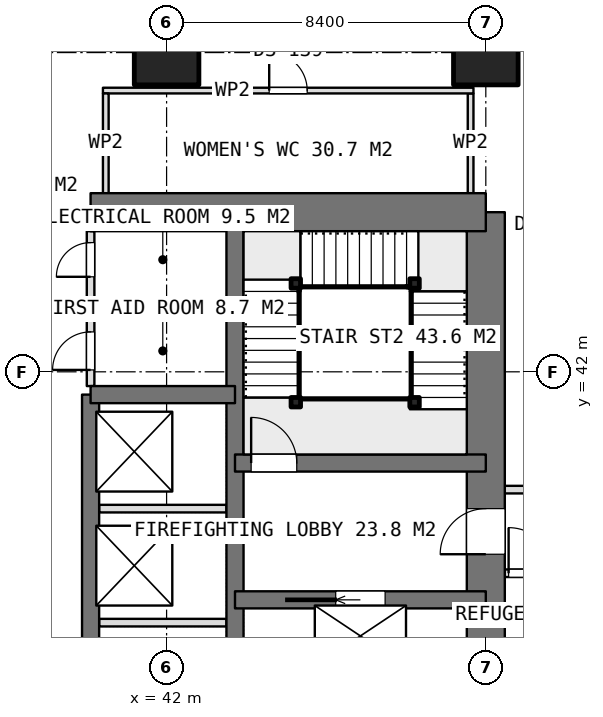
"""IFC4 building model, lengths in metres.
Left out: names, types, materials, properties, quantities, classifications, styles, units other than length and angle.
Written with IfcOpenShell. Run it as: python <this file> out.ifc"""

import sys

from ifc_helpers import new_model, si_unit, direction, frame, frame_2d, origin, origin_2d, place, context, subcontext, project, spatial, rectangle, extrude, element, fill, save


model = new_model("IFC4")
c1 = context("Model", 3, precision=1e-05, world=origin(), true_north=direction((0.0, 1.0)))
c2 = subcontext(c1, "Body", "Model", "MODEL_VIEW")
j1 = project(units=[si_unit("LENGTHUNIT", "METRE"), si_unit("PLANEANGLEUNIT", "RADIAN")], contexts=[c1])
p1 = place(None, origin())
s1 = spatial("IfcSite", under=j1, at=p1, CompositionType="ELEMENT")
p2 = place(p1, origin())
s2 = spatial("IfcBuilding", under=s1, at=p2, CompositionType="ELEMENT")
p3 = place(p2, frame((0.0, 0.0, 129.05)))
s3 = spatial("IfcBuildingStorey", under=s2, at=p3, CompositionType="ELEMENT", Elevation=129.05)
p4 = place(p3, frame((40.0, 46.2, 0.0), z_axis=(0.0, 0.0, 1.0), x_axis=(1.0, 0.0, 0.0)))
e1 = element("IfcWall", 1, at=p4, inside=s3, PredefinedType="SHEAR", context=c2, shape_type="SweptSolid", body=[
    extrude(rectangle(XDim=10.4, YDim=1.0, at=frame_2d((5.2, 0.0))), origin(), (0.0, 0.0, 1.0), 3.75),
])
p5 = place(p3, frame((50.4, 21.0, 0.0), z_axis=(0.0, 0.0, 1.0), x_axis=(0.0, 1.0, 0.0)))
e2 = element("IfcWall", 2, at=p5, inside=s3, PredefinedType="SHEAR", context=c2, shape_type="SweptSolid", body=[
    extrude(rectangle(XDim=25.2, YDim=1.0, at=frame_2d((12.6, 0.0))), origin(), (0.0, 0.0, 1.0), 3.75),
])
p6 = place(p5, frame((16.2, 0.0, 0.0)))
e3 = element("IfcOpeningElement", 3, at=p6, cuts=e2, PredefinedType="OPENING", context=c2, shape_type="SweptSolid", body=[
    extrude(rectangle(XDim=1.2, YDim=2.1, at=frame_2d((0.6, 1.05))), frame((0.0, 0.51, 0.0), z_axis=(0.0, -1.0, 0.0), x_axis=(1.0, 0.0, 0.0)), (0.0, 0.0, 1.0), 1.02),
])
p7 = place(p5, frame((10.05, 0.0, 0.0)))
e4 = element("IfcOpeningElement", 4, at=p7, cuts=e2, PredefinedType="OPENING", context=c2, shape_type="SweptSolid", body=[
    extrude(rectangle(XDim=0.9, YDim=2.1, at=frame_2d((0.45, 1.05))), frame((0.0, 0.51, 0.0), z_axis=(0.0, -1.0, 0.0), x_axis=(1.0, 0.0, 0.0)), (0.0, 0.0, 1.0), 1.02),
])
p8 = place(p5, frame((7.45, 0.0, 0.0)))
e5 = element("IfcOpeningElement", 5, at=p8, cuts=e2, PredefinedType="OPENING", context=c2, shape_type="SweptSolid", body=[
    extrude(rectangle(XDim=0.9, YDim=2.1, at=frame_2d((0.45, 1.05))), frame((0.0, 0.51, 0.0), z_axis=(0.0, -1.0, 0.0), x_axis=(1.0, 0.0, 0.0)), (0.0, 0.0, 1.0), 1.02),
])
p9 = place(p5, frame((0.7, 0.0, 0.0)))
e6 = element("IfcOpeningElement", 6, at=p9, cuts=e2, PredefinedType="OPENING", context=c2, shape_type="SweptSolid", body=[
    extrude(rectangle(XDim=1.2, YDim=2.1, at=frame_2d((0.6, 1.05))), frame((0.0, 0.51, 0.0), z_axis=(0.0, -1.0, 0.0), x_axis=(1.0, 0.0, 0.0)), (0.0, 0.0, 1.0), 1.02),
])
p10 = place(p3, frame((43.8, 21.0, 0.0), z_axis=(0.0, 0.0, 1.0), x_axis=(0.0, 1.0, 0.0)))
e7 = element("IfcWall", 7, at=p10, inside=s3, PredefinedType="SHEAR", context=c2, shape_type="SweptSolid", body=[
    extrude(rectangle(XDim=25.2, YDim=0.45, at=frame_2d((12.6, 0.0))), origin(), (0.0, 0.0, 1.0), 3.75),
])
p11 = place(p3, frame((40.0, 23.4, 0.0), z_axis=(0.0, 0.0, 1.0), x_axis=(0.0, 1.0, 0.0)))
e8 = element("IfcWall", 8, at=p11, inside=s3, PredefinedType="SHEAR", context=c2, shape_type="SweptSolid", body=[
    extrude(rectangle(XDim=18.0, YDim=0.45, at=frame_2d((9.0, 0.0))), origin(), (0.0, 0.0, 1.0), 3.75),
])
p12 = place(p11, frame((0.4, 0.0, 0.0)))
e9 = element("IfcOpeningElement", 9, at=p12, cuts=e8, PredefinedType="OPENING", context=c2, shape_type="SweptSolid", body=[
    extrude(rectangle(XDim=0.9, YDim=2.1, at=frame_2d((0.45, 1.05))), frame((0.0, 0.235, 0.0), z_axis=(0.0, -1.0, 0.0), x_axis=(1.0, 0.0, 0.0)), (0.0, 0.0, 1.0), 0.47),
])
p13 = place(p11, frame((3.35, 0.0, 0.0)))
e10 = element("IfcOpeningElement", 10, at=p13, cuts=e8, PredefinedType="OPENING", context=c2, shape_type="SweptSolid", body=[
    extrude(rectangle(XDim=1.0, YDim=2.1, at=frame_2d((0.5, 1.05))), frame((0.0, 0.235, 0.0), z_axis=(0.0, -1.0, 0.0), x_axis=(1.0, 0.0, 0.0)), (0.0, 0.0, 1.0), 0.47),
])
p14 = place(p3, frame((40.0, 41.4, 0.0), z_axis=(0.0, 0.0, 1.0), x_axis=(1.0, 0.0, 0.0)))
e11 = element("IfcWall", 11, at=p14, inside=s3, PredefinedType="SHEAR", context=c2, shape_type="SweptSolid", body=[
    extrude(rectangle(XDim=3.8, YDim=0.45, at=frame_2d((1.9, 0.0))), origin(), (0.0, 0.0, 1.0), 3.75),
])
p15 = place(p3, frame((43.8, 36.0, 0.0), z_axis=(0.0, 0.0, 1.0), x_axis=(1.0, 0.0, 0.0)))
e12 = element("IfcWall", 12, at=p15, inside=s3, PredefinedType="SHEAR", context=c2, shape_type="SweptSolid", body=[
    extrude(rectangle(XDim=6.6, YDim=0.45, at=frame_2d((3.3, 0.0))), origin(), (0.0, 0.0, 1.0), 3.75),
])
p16 = place(p15, frame((2.65, 0.0, 0.0)))
e13 = element("IfcOpeningElement", 13, at=p16, cuts=e12, PredefinedType="OPENING", context=c2, shape_type="SweptSolid", body=[
    extrude(rectangle(XDim=1.3, YDim=2.1, at=frame_2d((0.65, 1.05))), frame((0.0, 0.235, 0.0), z_axis=(0.0, -1.0, 0.0), x_axis=(1.0, 0.0, 0.0)), (0.0, 0.0, 1.0), 0.47),
])
p17 = place(p3, frame((43.8, 39.6, 0.0), z_axis=(0.0, 0.0, 1.0), x_axis=(1.0, 0.0, 0.0)))
e14 = element("IfcWall", 14, at=p17, inside=s3, PredefinedType="SHEAR", context=c2, shape_type="SweptSolid", body=[
    extrude(rectangle(XDim=6.6, YDim=0.45, at=frame_2d((3.3, 0.0))), origin(), (0.0, 0.0, 1.0), 3.75),
])
p18 = place(p17, frame((0.425, 0.0, 0.0)))
e15 = element("IfcOpeningElement", 15, at=p18, cuts=e14, PredefinedType="OPENING", context=c2, shape_type="SweptSolid", body=[
    extrude(rectangle(XDim=1.2, YDim=2.1, at=frame_2d((0.6, 1.05))), frame((0.0, 0.235, 0.0), z_axis=(0.0, -1.0, 0.0), x_axis=(1.0, 0.0, 0.0)), (0.0, 0.0, 1.0), 0.47),
])
for number, where, z_axis, x_axis in (
    (16, (42.0, 50.4, 0.0), (0.0, 0.0, 1.0), (1.0, 0.0, 0.0)),
    (17, (50.4, 50.4, 0.0), (0.0, 0.0, 1.0), (1.0, 0.0, 0.0)),
):
    element("IfcColumn", number, at=place(p3, frame(where, z_axis=z_axis, x_axis=x_axis)), inside=s3, PredefinedType="COLUMN", context=c2, shape_type="SweptSolid", body=[
        extrude(rectangle(XDim=1.7, YDim=1.7, at=origin_2d()), origin(), (0.0, 0.0, 1.0), 3.75),
    ])
for number, where, z_axis, x_axis in (
    (18, (40.225, 35.4, 0.0), (0.0, 0.0, 1.0), (1.0, 0.0, 0.0)),
    (19, (40.225, 38.4, 0.0), (0.0, 0.0, 1.0), (1.0, 0.0, 0.0)),
):
    element("IfcWall", number, at=place(p3, frame(where, z_axis=z_axis, x_axis=x_axis)), inside=s3, PredefinedType="PARTITIONING", context=c2, shape_type="SweptSolid", body=[
        extrude(rectangle(XDim=3.35, YDim=0.2, at=frame_2d((1.675, 0.0))), origin(), (0.0, 0.0, 1.0), 3.5),
    ])
p19 = place(p3, frame((40.0, 41.625, 0.0), z_axis=(0.0, 0.0, 1.0), x_axis=(0.0, 1.0, 0.0)))
e20 = element("IfcWall", 20, at=p19, inside=s3, PredefinedType="PARTITIONING", context=c2, shape_type="SweptSolid", body=[
    extrude(rectangle(XDim=4.075, YDim=0.2, at=frame_2d((2.038, 0.0))), origin(), (0.0, 0.0, 1.0), 3.5),
])
p20 = place(p19, frame((2.875, 0.0, 0.0)))
e21 = element("IfcOpeningElement", 21, at=p20, cuts=e20, PredefinedType="OPENING", context=c2, shape_type="SweptSolid", body=[
    extrude(rectangle(XDim=0.9, YDim=2.1, at=frame_2d((0.45, 1.05))), frame((0.0, 0.11, 0.0), z_axis=(0.0, -1.0, 0.0), x_axis=(1.0, 0.0, 0.0)), (0.0, 0.0, 1.0), 0.22),
])
p21 = place(p19, frame((0.425, 0.0, 0.0)))
e22 = element("IfcOpeningElement", 22, at=p21, cuts=e20, PredefinedType="OPENING", context=c2, shape_type="SweptSolid", body=[
    extrude(rectangle(XDim=1.0, YDim=2.1, at=frame_2d((0.5, 1.05))), frame((0.0, 0.11, 0.0), z_axis=(0.0, -1.0, 0.0), x_axis=(1.0, 0.0, 0.0)), (0.0, 0.0, 1.0), 0.22),
])
p22 = place(p3, frame((40.0, 43.7, 0.0), z_axis=(0.0, 0.0, 1.0), x_axis=(1.0, 0.0, 0.0)))
e23 = element("IfcWall", 23, at=p22, inside=s3, PredefinedType="PARTITIONING", context=c2, shape_type="SweptSolid", body=[
    extrude(rectangle(XDim=3.575, YDim=0.2, at=frame_2d((1.788, 0.0))), origin(), (0.0, 0.0, 1.0), 3.5),
])
p23 = place(p3, frame((40.325, 49.4, 0.0), z_axis=(0.0, 0.0, 1.0), x_axis=(1.0, 0.0, 0.0)))
e24 = element("IfcWall", 24, at=p23, inside=s3, PredefinedType="PARTITIONING", context=c2, shape_type="SweptSolid", body=[
    extrude(rectangle(XDim=9.75, YDim=0.15, at=frame_2d((4.875, 0.0))), origin(), (0.0, 0.0, 1.0), 3.5),
])
p24 = place(p23, frame((4.375, 0.0, 0.0)))
e25 = element("IfcOpeningElement", 25, at=p24, cuts=e24, PredefinedType="OPENING", context=c2, shape_type="SweptSolid", body=[
    extrude(rectangle(XDim=1.0, YDim=2.1, at=frame_2d((0.5, 1.05))), frame((0.0, 0.085, 0.0), z_axis=(0.0, -1.0, 0.0), x_axis=(1.0, 0.0, 0.0)), (0.0, 0.0, 1.0), 0.17),
])
for number, where, z_axis, x_axis in (
    (26, (40.4, 46.7, 0.0), (0.0, 0.0, 1.0), (0.0, 1.0, 0.0)),
    (27, (50.0, 46.7, 0.0), (0.0, 0.0, 1.0), (0.0, 1.0, 0.0)),
):
    element("IfcWall", number, at=place(p3, frame(where, z_axis=z_axis, x_axis=x_axis)), inside=s3, PredefinedType="PARTITIONING", context=c2, shape_type="SweptSolid", body=[
        extrude(rectangle(XDim=2.625, YDim=0.15, at=frame_2d((1.312, 0.0))), origin(), (0.0, 0.0, 1.0), 3.5),
    ])
for number, where, z_axis, x_axis in (
    (28, (45.4, 41.2, 0.0), (0.0, 0.0, 1.0), (1.0, 0.0, 0.0)),
    (29, (45.4, 44.325, 0.0), (0.0, 0.0, 1.0), (1.0, 0.0, 0.0)),
    (30, (48.525, 44.325, 0.0), (0.0, 0.0, 1.0), (1.0, 0.0, 0.0)),
    (31, (48.525, 41.2, 0.0), (0.0, 0.0, 1.0), (1.0, 0.0, 0.0)),
):
    element("IfcColumn", number, at=place(p3, frame(where, z_axis=z_axis, x_axis=x_axis)), inside=s3, PredefinedType="COLUMN", context=c2, shape_type="SweptSolid", body=[
        extrude(rectangle(XDim=0.25, YDim=0.25, at=origin_2d()), origin(), (0.0, 0.0, 1.0), 3.75),
    ])
p25 = place(p3, frame((50.4, 38.9, 0.0), z_axis=(0.0, 0.0, 1.0), x_axis=(1.0, 0.0, 0.0)))
e32 = element("IfcWall", 32, at=p25, inside=s3, PredefinedType="PARTITIONING", context=c2, shape_type="SweptSolid", body=[
    extrude(rectangle(XDim=6.75, YDim=0.2, at=frame_2d((3.375, 0.0))), origin(), (0.0, 0.0, 1.0), 3.5),
])
p26 = place(p3, frame((50.4, 36.7, 0.0), z_axis=(0.0, 0.0, 1.0), x_axis=(1.0, 0.0, 0.0)))
e33 = element("IfcWall", 33, at=p26, inside=s3, PredefinedType="PARTITIONING", context=c2, shape_type="SweptSolid", body=[
    extrude(rectangle(XDim=6.75, YDim=0.2, at=frame_2d((3.375, 0.0))), origin(), (0.0, 0.0, 1.0), 3.5),
])
p27 = place(p26, frame((0.6, 0.0, 0.0)))
e34 = element("IfcOpeningElement", 34, at=p27, cuts=e33, PredefinedType="OPENING", context=c2, shape_type="SweptSolid", body=[
    extrude(rectangle(XDim=1.2, YDim=2.1, at=frame_2d((0.6, 1.05))), frame((0.0, 0.11, 0.0), z_axis=(0.0, -1.0, 0.0), x_axis=(1.0, 0.0, 0.0)), (0.0, 0.0, 1.0), 0.22),
])
p28 = place(p6, origin())
e35 = element("IfcDoor", 35, at=p28, inside=s3, OperationType="SINGLE_SWING_LEFT", PredefinedType="DOOR", context=c2, shape_type="SweptSolid", body=[
    extrude(rectangle(XDim=1.2, YDim=2.1, at=frame_2d((0.6, 1.05))), frame((0.0, 0.025, 0.0), z_axis=(0.0, -1.0, 0.0), x_axis=(1.0, 0.0, 0.0)), (0.0, 0.0, 1.0), 0.05),
])
fill(e3, e35)
p29 = place(p20, origin())
e36 = element("IfcDoor", 36, at=p29, inside=s3, OperationType="SINGLE_SWING_LEFT", PredefinedType="DOOR", context=c2, shape_type="SweptSolid", body=[
    extrude(rectangle(XDim=0.9, YDim=2.1, at=frame_2d((0.45, 1.05))), frame((0.0, 0.025, 0.0), z_axis=(0.0, -1.0, 0.0), x_axis=(1.0, 0.0, 0.0)), (0.0, 0.0, 1.0), 0.05),
])
fill(e21, e36)
p30 = place(p21, origin())
e37 = element("IfcDoor", 37, at=p30, inside=s3, OperationType="SINGLE_SWING_LEFT", PredefinedType="DOOR", context=c2, shape_type="SweptSolid", body=[
    extrude(rectangle(XDim=1.0, YDim=2.1, at=frame_2d((0.5, 1.05))), frame((0.0, 0.025, 0.0), z_axis=(0.0, -1.0, 0.0), x_axis=(1.0, 0.0, 0.0)), (0.0, 0.0, 1.0), 0.05),
])
fill(e22, e37)
p31 = place(p16, origin())
e38 = element("IfcDoor", 38, at=p31, inside=s3, OperationType="SLIDING_TO_LEFT", PredefinedType="USERDEFINED", context=c2, shape_type="SweptSolid", body=[
    extrude(rectangle(XDim=1.3, YDim=2.1, at=frame_2d((0.65, 1.05))), frame((0.0, 0.025, 0.0), z_axis=(0.0, -1.0, 0.0), x_axis=(1.0, 0.0, 0.0)), (0.0, 0.0, 1.0), 0.05),
])
fill(e13, e38)
p32 = place(p24, origin())
e39 = element("IfcDoor", 39, at=p32, inside=s3, OperationType="SINGLE_SWING_LEFT", PredefinedType="DOOR", context=c2, shape_type="SweptSolid", body=[
    extrude(rectangle(XDim=1.0, YDim=2.1, at=frame_2d((0.5, 1.05))), frame((0.0, 0.025, 0.0), z_axis=(0.0, -1.0, 0.0), x_axis=(1.0, 0.0, 0.0)), (0.0, 0.0, 1.0), 0.05),
])
fill(e25, e39)
p33 = place(p18, origin())
e40 = element("IfcDoor", 40, at=p33, inside=s3, OperationType="SINGLE_SWING_RIGHT", PredefinedType="DOOR", context=c2, shape_type="SweptSolid", body=[
    extrude(rectangle(XDim=1.2, YDim=2.1, at=frame_2d((0.6, 1.05))), frame((0.0, 0.025, 0.0), z_axis=(0.0, -1.0, 0.0), x_axis=(1.0, 0.0, 0.0)), (0.0, 0.0, 1.0), 0.05),
])
fill(e15, e40)
p34 = place(p27, origin())
e41 = element("IfcDoor", 41, at=p34, inside=s3, OperationType="SINGLE_SWING_LEFT", PredefinedType="DOOR", context=c2, shape_type="SweptSolid", body=[
    extrude(rectangle(XDim=1.2, YDim=2.1, at=frame_2d((0.6, 1.05))), frame((0.0, 0.025, 0.0), z_axis=(0.0, -1.0, 0.0), x_axis=(1.0, 0.0, 0.0)), (0.0, 0.0, 1.0), 0.05),
])
fill(e34, e41)
save(model, sys.argv[1])
